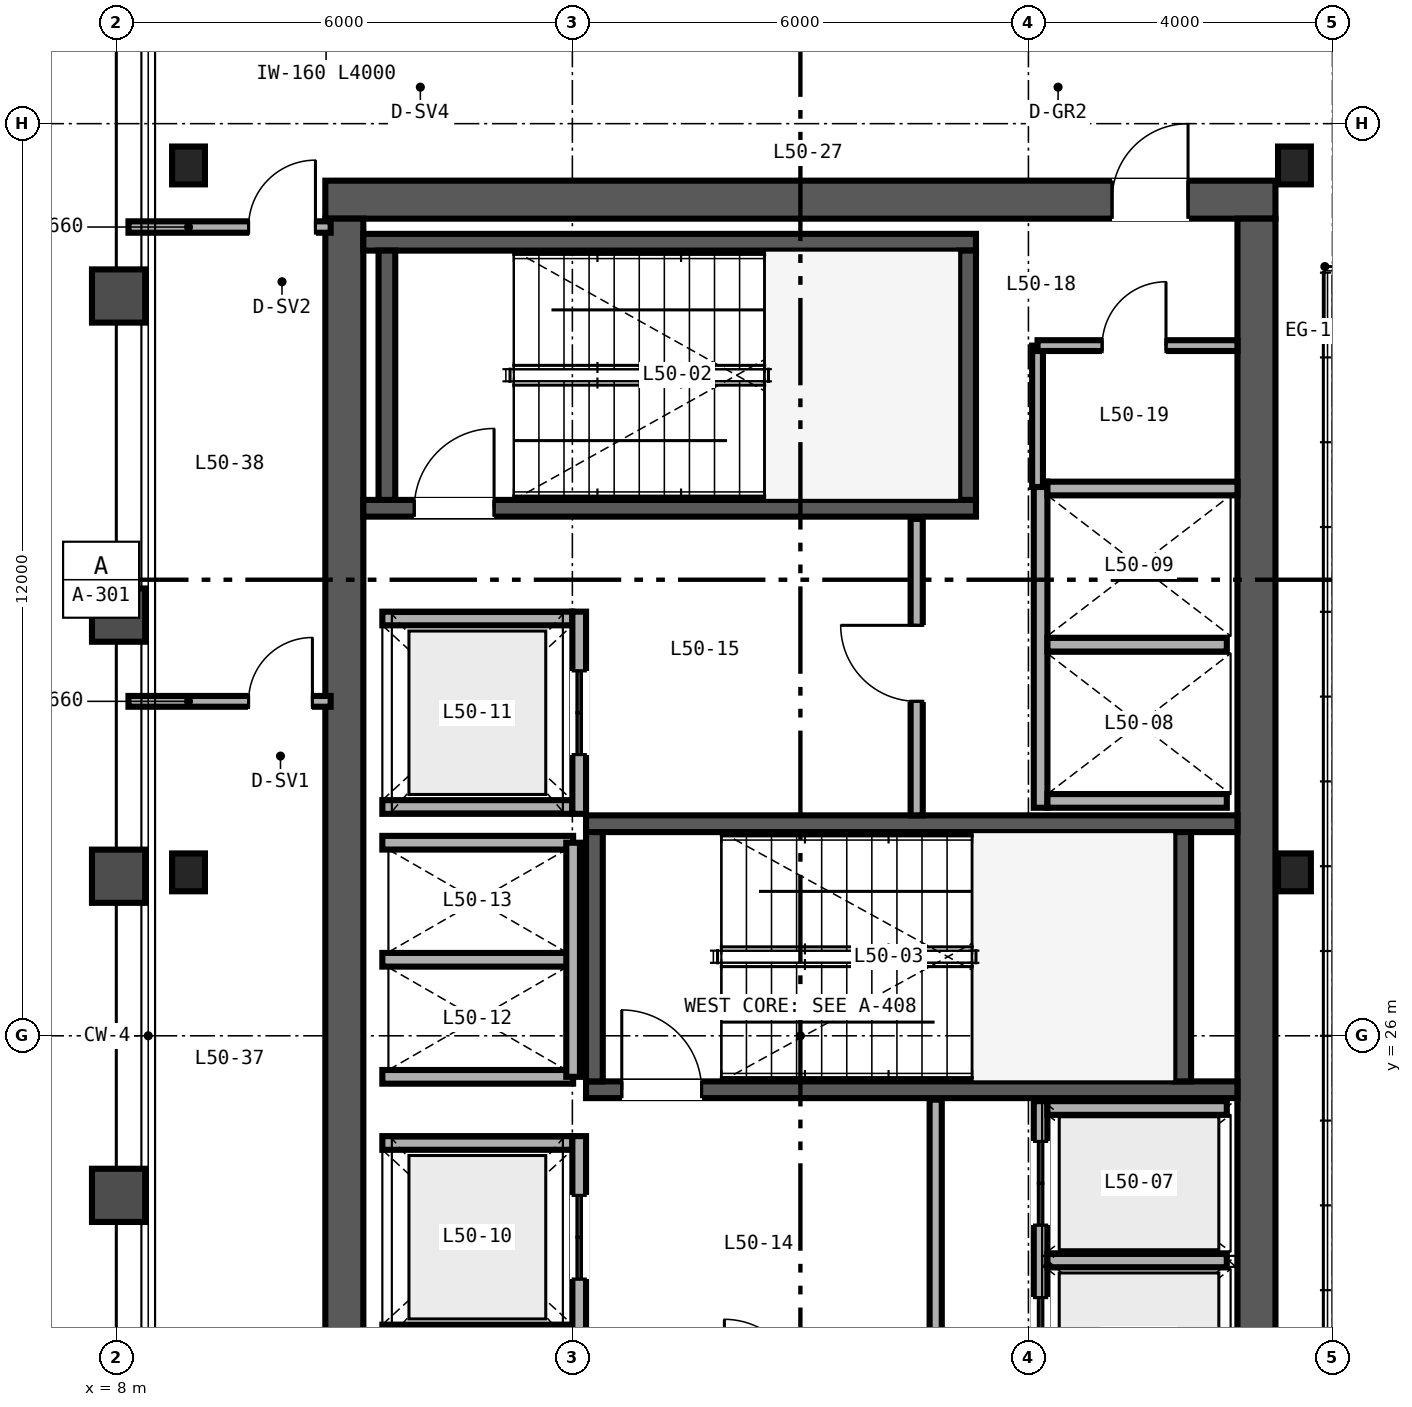
"""IFC4 building model, lengths in metres.
Left out: names, types, materials, properties, quantities, classifications, styles, units other than length and angle.
Written with IfcOpenShell. Run it as: python <this file> out.ifc"""

import sys

from ifc_helpers import new_model, si_unit, direction, frame, frame_2d, origin, origin_2d, place, context, subcontext, project, spatial, rectangle, i_section, extrude, source, transform, mapped, element, fill, save


model = new_model("IFC4")
c1 = context("Model", 3, precision=1e-05, world=origin(), true_north=direction((0.0, 1.0)))
c2 = subcontext(c1, "Body", "Model", "MODEL_VIEW")
j1 = project(units=[si_unit("LENGTHUNIT", "METRE"), si_unit("PLANEANGLEUNIT", "RADIAN")], contexts=[c1])
p1 = place(None, origin())
s1 = spatial("IfcSite", under=j1, at=p1, CompositionType="ELEMENT")
p2 = place(p1, origin())
s2 = spatial("IfcBuilding", under=s1, at=p2, CompositionType="ELEMENT")
p3 = place(p2, frame((0.0, 0.0, 199.2)))
s3 = spatial("IfcBuildingStorey", under=s2, at=p3, CompositionType="ELEMENT", Elevation=199.2)
p4 = place(p3, frame((10.75, 37.0, 0.0), z_axis=(0.0, 0.0, 1.0), x_axis=(1.0, 0.0, 0.0)))
e1 = element("IfcWall", 1, at=p4, inside=s3, PredefinedType="SHEAR", context=c2, shape_type="SweptSolid", body=[
    extrude(rectangle(XDim=12.5, YDim=0.5, at=frame_2d((6.25, 0.0))), origin(), (0.0, 0.0, 1.0), 3.37),
])
p5 = place(p4, frame((10.35, 0.0, 0.0)))
e2 = element("IfcOpeningElement", 2, at=p5, cuts=e1, PredefinedType="OPENING", context=c2, shape_type="SweptSolid", body=[
    extrude(rectangle(XDim=1.0, YDim=2.15, at=frame_2d((0.5, 1.075))), frame((0.0, 0.26, 0.0), z_axis=(0.0, -1.0, 0.0), x_axis=(1.0, 0.0, 0.0)), (0.0, 0.0, 1.0), 0.52),
])
for number, where, z_axis, x_axis in (
    (3, (11.0, 15.25, 0.0), (0.0, 0.0, 1.0), (0.0, 1.0, 0.0)),
    (4, (23.0, 15.25, 0.0), (0.0, 0.0, 1.0), (0.0, 1.0, 0.0)),
):
    element("IfcWall", number, at=place(p3, frame(where, z_axis=z_axis, x_axis=x_axis)), inside=s3, PredefinedType="SHEAR", context=c2, shape_type="SweptSolid", body=[
        extrude(rectangle(XDim=21.5, YDim=0.5, at=frame_2d((10.75, 0.0))), origin(), (0.0, 0.0, 1.0), 3.37),
    ])
p6 = place(p3, frame((11.25, 32.94, 0.0), z_axis=(0.0, 0.0, 1.0), x_axis=(1.0, 0.0, 0.0)))
e5 = element("IfcWall", 5, at=p6, inside=s3, PredefinedType="SHEAR", context=c2, shape_type="SweptSolid", body=[
    extrude(rectangle(XDim=8.06, YDim=0.22, at=frame_2d((4.03, 0.0))), origin(), (0.0, 0.0, 1.0), 3.4),
])
p7 = place(p6, frame((0.67, 0.0, 0.0)))
e6 = element("IfcOpeningElement", 6, at=p7, cuts=e5, PredefinedType="OPENING", context=c2, shape_type="SweptSolid", body=[
    extrude(rectangle(XDim=1.05, YDim=2.15, at=frame_2d((0.525, 1.075))), frame((0.0, 0.12, 0.0), z_axis=(0.0, -1.0, 0.0), x_axis=(1.0, 0.0, 0.0)), (0.0, 0.0, 1.0), 0.24),
])
p8 = place(p3, frame((11.25, 36.44, 0.0), z_axis=(0.0, 0.0, 1.0), x_axis=(1.0, 0.0, 0.0)))
e7 = element("IfcWall", 7, at=p8, inside=s3, PredefinedType="SHEAR", context=c2, shape_type="SweptSolid", body=[
    extrude(rectangle(XDim=8.06, YDim=0.22, at=frame_2d((4.03, 0.0))), origin(), (0.0, 0.0, 1.0), 3.4),
])
for number, where, z_axis, x_axis in (
    (8, (11.56, 33.05, 0.0), (0.0, 0.0, 1.0), (0.0, 1.0, 0.0)),
    (9, (19.2, 33.05, 0.0), (0.0, 0.0, 1.0), (0.0, 1.0, 0.0)),
):
    element("IfcWall", number, at=place(p3, frame(where, z_axis=z_axis, x_axis=x_axis)), inside=s3, PredefinedType="SHEAR", context=c2, shape_type="SweptSolid", body=[
        extrude(rectangle(XDim=3.28, YDim=0.22, at=frame_2d((1.64, 0.0))), origin(), (0.0, 0.0, 1.0), 3.4),
    ])
p9 = place(p3, frame((14.18, 25.29, 0.0), z_axis=(0.0, 0.0, 1.0), x_axis=(1.0, 0.0, 0.0)))
e10 = element("IfcWall", 10, at=p9, inside=s3, PredefinedType="SHEAR", context=c2, shape_type="SweptSolid", body=[
    extrude(rectangle(XDim=8.57, YDim=0.22, at=frame_2d((4.285, 0.0))), origin(), (0.0, 0.0, 1.0), 3.4),
])
p10 = place(p9, frame((0.47, 0.0, 0.0)))
e11 = element("IfcOpeningElement", 11, at=p10, cuts=e10, PredefinedType="OPENING", context=c2, shape_type="SweptSolid", body=[
    extrude(rectangle(XDim=1.05, YDim=2.15, at=frame_2d((0.525, 1.075))), frame((0.0, 0.12, 0.0), z_axis=(0.0, -1.0, 0.0), x_axis=(1.0, 0.0, 0.0)), (0.0, 0.0, 1.0), 0.24),
])
p11 = place(p3, frame((14.18, 28.79, 0.0), z_axis=(0.0, 0.0, 1.0), x_axis=(1.0, 0.0, 0.0)))
e12 = element("IfcWall", 12, at=p11, inside=s3, PredefinedType="SHEAR", context=c2, shape_type="SweptSolid", body=[
    extrude(rectangle(XDim=8.57, YDim=0.22, at=frame_2d((4.285, 0.0))), origin(), (0.0, 0.0, 1.0), 3.4),
])
for number, where, z_axis, x_axis in (
    (13, (14.29, 25.4, 0.0), (0.0, 0.0, 1.0), (0.0, 1.0, 0.0)),
    (14, (22.03, 25.4, 0.0), (0.0, 0.0, 1.0), (0.0, 1.0, 0.0)),
):
    element("IfcWall", number, at=place(p3, frame(where, z_axis=z_axis, x_axis=x_axis)), inside=s3, PredefinedType="SHEAR", context=c2, shape_type="SweptSolid", body=[
        extrude(rectangle(XDim=3.28, YDim=0.22, at=frame_2d((1.64, 0.0))), origin(), (0.0, 0.0, 1.0), 3.4),
    ])
m1 = source(origin(), c2, "Body", "SweptSolid", [
    extrude(i_section(OverallWidth=0.432, OverallDepth=0.498, WebThickness=0.056, FlangeThickness=0.089, FilletRadius=0.025, at=origin_2d()), origin(), (0.0, 0.0, 1.0), 3.37),
])
for number, where, z_axis, x_axis in (
    (15, (8.95, 28.15, 0.0), (0.0, 0.0, 1.0), (1.0, 0.0, 0.0)),
    (16, (23.5, 28.15, 0.0), (0.0, 0.0, 1.0), (1.0, 0.0, 0.0)),
    (17, (8.95, 37.45, 0.0), (0.0, 0.0, 1.0), (1.0, 0.0, 0.0)),
    (18, (23.5, 37.45, 0.0), (0.0, 0.0, 1.0), (1.0, 0.0, 0.0)),
):
    element("IfcColumn", number, at=place(p3, frame(where, z_axis=z_axis, x_axis=x_axis)), inside=s3, PredefinedType="COLUMN", context=c2, shape_type="MappedRepresentation", body=[
        mapped(m1, transform((0.0, 0.0, 0.0), scale=1.0)),
    ])
p12 = place(p3, frame((20.16, 18.82, 0.0), z_axis=(0.0, 0.0, 1.0), x_axis=(0.0, 1.0, 0.0)))
e19 = element("IfcWall", 19, at=p12, inside=s3, PredefinedType="SOLIDWALL", context=c2, shape_type="SweptSolid", body=[
    extrude(rectangle(XDim=6.32, YDim=0.18, at=frame_2d((3.16, 0.0))), origin(), (0.0, 0.0, 1.0), 2.47),
])
p13 = place(p12, frame((0.555, 0.0, 0.0)))
e20 = element("IfcOpeningElement", 20, at=p13, cuts=e19, PredefinedType="OPENING", context=c2, shape_type="SweptSolid", body=[
    extrude(rectangle(XDim=1.1, YDim=2.2, at=frame_2d((0.55, 1.1))), frame((0.0, 0.1, 0.0), z_axis=(0.0, -1.0, 0.0), x_axis=(1.0, 0.0, 0.0)), (0.0, 0.0, 1.0), 0.2),
])
p14 = place(p12, frame((2.635, 0.0, 0.0)))
e21 = element("IfcOpeningElement", 21, at=p14, cuts=e19, PredefinedType="OPENING", context=c2, shape_type="SweptSolid", body=[
    extrude(rectangle(XDim=1.1, YDim=2.2, at=frame_2d((0.55, 1.1))), frame((0.0, 0.1, 0.0), z_axis=(0.0, -1.0, 0.0), x_axis=(1.0, 0.0, 0.0)), (0.0, 0.0, 1.0), 0.2),
])
p15 = place(p12, frame((4.69, 0.0, 0.0)))
e22 = element("IfcOpeningElement", 22, at=p15, cuts=e19, PredefinedType="OPENING", context=c2, shape_type="SweptSolid", body=[
    extrude(rectangle(XDim=1.1, YDim=2.2, at=frame_2d((0.55, 1.1))), frame((0.0, 0.1, 0.0), z_axis=(0.0, -1.0, 0.0), x_axis=(1.0, 0.0, 0.0)), (0.0, 0.0, 1.0), 0.2),
])
for number, where, z_axis, x_axis in (
    (23, (20.25, 25.05, 0.0), (0.0, 0.0, 1.0), (1.0, 0.0, 0.0)),
    (24, (20.25, 23.045, 0.0), (0.0, 0.0, 1.0), (1.0, 0.0, 0.0)),
):
    element("IfcWall", number, at=place(p3, frame(where, z_axis=z_axis, x_axis=x_axis)), inside=s3, PredefinedType="SOLIDWALL", context=c2, shape_type="SweptSolid", body=[
        extrude(rectangle(XDim=2.36, YDim=0.18, at=frame_2d((1.18, 0.0))), origin(), (0.0, 0.0, 1.0), 3.37),
    ])
p16 = place(p3, frame((20.16, 29.0, 0.0), z_axis=(0.0, 0.0, 1.0), x_axis=(0.0, 1.0, 0.0)))
e25 = element("IfcWall", 25, at=p16, inside=s3, PredefinedType="SOLIDWALL", context=c2, shape_type="SweptSolid", body=[
    extrude(rectangle(XDim=4.29, YDim=0.18, at=frame_2d((2.145, 0.0))), origin(), (0.0, 0.0, 1.0), 3.37),
])
p17 = place(p3, frame((20.25, 29.09, 0.0), z_axis=(0.0, 0.0, 1.0), x_axis=(1.0, 0.0, 0.0)))
e26 = element("IfcWall", 26, at=p17, inside=s3, PredefinedType="SOLIDWALL", context=c2, shape_type="SweptSolid", body=[
    extrude(rectangle(XDim=2.36, YDim=0.18, at=frame_2d((1.18, 0.0))), origin(), (0.0, 0.0, 1.0), 3.37),
])
p18 = place(p3, frame((20.25, 33.2, 0.0), z_axis=(0.0, 0.0, 1.0), x_axis=(1.0, 0.0, 0.0)))
e27 = element("IfcWall", 27, at=p18, inside=s3, PredefinedType="SOLIDWALL", context=c2, shape_type="SweptSolid", body=[
    extrude(rectangle(XDim=2.5, YDim=0.18, at=frame_2d((1.25, 0.0))), origin(), (0.0, 0.0, 1.0), 3.37),
])
p19 = place(p3, frame((20.25, 31.145, 0.0), z_axis=(0.0, 0.0, 1.0), x_axis=(1.0, 0.0, 0.0)))
e28 = element("IfcWall", 28, at=p19, inside=s3, PredefinedType="SOLIDWALL", context=c2, shape_type="SweptSolid", body=[
    extrude(rectangle(XDim=2.36, YDim=0.18, at=frame_2d((1.18, 0.0))), origin(), (0.0, 0.0, 1.0), 3.37),
])
for number, where, z_axis, x_axis in (
    (29, (11.5, 22.11, 0.0), (0.0, 0.0, 1.0), (1.0, 0.0, 0.0)),
    (30, (11.5, 24.59, 0.0), (0.0, 0.0, 1.0), (1.0, 0.0, 0.0)),
):
    element("IfcWall", number, at=place(p3, frame(where, z_axis=z_axis, x_axis=x_axis)), inside=s3, PredefinedType="SOLIDWALL", context=c2, shape_type="SweptSolid", body=[
        extrude(rectangle(XDim=2.5, YDim=0.18, at=frame_2d((1.25, 0.0))), origin(), (0.0, 0.0, 1.0), 3.37),
    ])
p20 = place(p3, frame((14.09, 22.02, 0.0), z_axis=(0.0, 0.0, 1.0), x_axis=(0.0, 1.0, 0.0)))
e31 = element("IfcWall", 31, at=p20, inside=s3, PredefinedType="SOLIDWALL", context=c2, shape_type="SweptSolid", body=[
    extrude(rectangle(XDim=2.66, YDim=0.18, at=frame_2d((1.33, 0.0))), origin(), (0.0, 0.0, 1.0), 3.37),
])
p21 = place(p20, frame((0.78, 0.0, 0.0)))
e32 = element("IfcOpeningElement", 32, at=p21, cuts=e31, PredefinedType="OPENING", context=c2, shape_type="SweptSolid", body=[
    extrude(rectangle(XDim=1.1, YDim=2.2, at=frame_2d((0.55, 1.1))), frame((0.0, 0.1, 0.0), z_axis=(0.0, -1.0, 0.0), x_axis=(1.0, 0.0, 0.0)), (0.0, 0.0, 1.0), 0.2),
])
for number, where, z_axis, x_axis in (
    (33, (11.5, 29.01, 0.0), (0.0, 0.0, 1.0), (1.0, 0.0, 0.0)),
    (34, (11.5, 31.49, 0.0), (0.0, 0.0, 1.0), (1.0, 0.0, 0.0)),
):
    element("IfcWall", number, at=place(p3, frame(where, z_axis=z_axis, x_axis=x_axis)), inside=s3, PredefinedType="SOLIDWALL", context=c2, shape_type="SweptSolid", body=[
        extrude(rectangle(XDim=2.5, YDim=0.18, at=frame_2d((1.25, 0.0))), origin(), (0.0, 0.0, 1.0), 3.37),
    ])
p22 = place(p3, frame((14.09, 28.92, 0.0), z_axis=(0.0, 0.0, 1.0), x_axis=(0.0, 1.0, 0.0)))
e35 = element("IfcWall", 35, at=p22, inside=s3, PredefinedType="SOLIDWALL", context=c2, shape_type="SweptSolid", body=[
    extrude(rectangle(XDim=2.66, YDim=0.18, at=frame_2d((1.33, 0.0))), origin(), (0.0, 0.0, 1.0), 3.37),
])
p23 = place(p22, frame((0.78, 0.0, 0.0)))
e36 = element("IfcOpeningElement", 36, at=p23, cuts=e35, PredefinedType="OPENING", context=c2, shape_type="SweptSolid", body=[
    extrude(rectangle(XDim=1.1, YDim=2.2, at=frame_2d((0.55, 1.1))), frame((0.0, 0.1, 0.0), z_axis=(0.0, -1.0, 0.0), x_axis=(1.0, 0.0, 0.0)), (0.0, 0.0, 1.0), 0.2),
])
for number, where, z_axis, x_axis in (
    (37, (11.5, 25.46, 0.0), (0.0, 0.0, 1.0), (1.0, 0.0, 0.0)),
    (38, (11.5, 27.0, 0.0), (0.0, 0.0, 1.0), (1.0, 0.0, 0.0)),
    (39, (11.5, 28.54, 0.0), (0.0, 0.0, 1.0), (1.0, 0.0, 0.0)),
):
    element("IfcWall", number, at=place(p3, frame(where, z_axis=z_axis, x_axis=x_axis)), inside=s3, PredefinedType="SOLIDWALL", context=c2, shape_type="SweptSolid", body=[
        extrude(rectangle(XDim=2.51, YDim=0.18, at=frame_2d((1.255, 0.0))), origin(), (0.0, 0.0, 1.0), 3.37),
    ])
p24 = place(p3, frame((14.01, 25.46, 0.0), z_axis=(0.0, 0.0, 1.0), x_axis=(0.0, 1.0, 0.0)))
e40 = element("IfcWall", 40, at=p24, inside=s3, PredefinedType="SOLIDWALL", context=c2, shape_type="SweptSolid", body=[
    extrude(rectangle(XDim=3.08, YDim=0.18, at=frame_2d((1.54, 0.0))), origin(), (0.0, 0.0, 1.0), 3.37),
])
p25 = place(p3, frame((18.78, 21.35, 0.0), z_axis=(0.0, 0.0, 1.0), x_axis=(0.0, 1.0, 0.0)))
e41 = element("IfcWall", 41, at=p25, inside=s3, PredefinedType="PARTITIONING", context=c2, shape_type="SweptSolid", body=[
    extrude(rectangle(XDim=3.81, YDim=0.16, at=frame_2d((1.905, 0.0))), origin(), (0.0, 0.0, 1.0), 3.37),
])
p26 = place(p3, frame((18.53, 28.9, 0.0), z_axis=(0.0, 0.0, 1.0), x_axis=(0.0, 1.0, 0.0)))
e42 = element("IfcWall", 42, at=p26, inside=s3, PredefinedType="PARTITIONING", context=c2, shape_type="SweptSolid", body=[
    extrude(rectangle(XDim=3.9, YDim=0.16, at=frame_2d((1.95, 0.0))), origin(), (0.0, 0.0, 1.0), 3.37),
])
p27 = place(p26, frame((1.5, 0.0, 0.0)))
e43 = element("IfcOpeningElement", 43, at=p27, cuts=e42, PredefinedType="OPENING", context=c2, shape_type="SweptSolid", body=[
    extrude(rectangle(XDim=1.0, YDim=2.15, at=frame_2d((0.5, 1.075))), frame((0.0, 0.09, 0.0), z_axis=(0.0, -1.0, 0.0), x_axis=(1.0, 0.0, 0.0)), (0.0, 0.0, 1.0), 0.18),
])
p28 = place(p3, frame((20.12, 33.22, 0.0), z_axis=(0.0, 0.0, 1.0), x_axis=(0.0, 1.0, 0.0)))
e44 = element("IfcWall", 44, at=p28, inside=s3, PredefinedType="PARTITIONING", context=c2, shape_type="SweptSolid", body=[
    extrude(rectangle(XDim=1.86, YDim=0.142, at=frame_2d((0.93, 0.0))), origin(), (0.0, 0.0, 1.0), 3.37),
])
p29 = place(p3, frame((20.12, 35.08, 0.0), z_axis=(0.0, 0.0, 1.0), x_axis=(1.0, 0.0, 0.0)))
e45 = element("IfcWall", 45, at=p29, inside=s3, PredefinedType="PARTITIONING", context=c2, shape_type="SweptSolid", body=[
    extrude(rectangle(XDim=2.63, YDim=0.142, at=frame_2d((1.315, 0.0))), origin(), (0.0, 0.0, 1.0), 3.37),
])
p30 = place(p29, frame((0.85, 0.0, 0.0)))
e46 = element("IfcOpeningElement", 46, at=p30, cuts=e45, PredefinedType="OPENING", context=c2, shape_type="SweptSolid", body=[
    extrude(rectangle(XDim=0.84, YDim=2.1, at=frame_2d((0.42, 1.05))), frame((0.0, 0.081, 0.0), z_axis=(0.0, -1.0, 0.0), x_axis=(1.0, 0.0, 0.0)), (0.0, 0.0, 1.0), 0.162),
])
p31 = place(p3, frame((8.16, 36.64, 0.0), z_axis=(0.0, 0.0, 1.0), x_axis=(1.0, 0.0, 0.0)))
e47 = element("IfcWall", 47, at=p31, inside=s3, PredefinedType="PARTITIONING", context=c2, shape_type="SweptSolid", body=[
    extrude(rectangle(XDim=2.66, YDim=0.15, at=frame_2d((1.33, 0.0))), origin(), (0.0, 0.0, 1.0), 2.753),
])
p32 = place(p31, frame((1.58, 0.0, 0.0)))
e48 = element("IfcOpeningElement", 48, at=p32, cuts=e47, PredefinedType="OPENING", context=c2, shape_type="SweptSolid", body=[
    extrude(rectangle(XDim=0.88, YDim=2.15, at=frame_2d((0.44, 1.075))), frame((0.0, 0.085, 0.0), z_axis=(0.0, -1.0, 0.0), x_axis=(1.0, 0.0, 0.0)), (0.0, 0.0, 1.0), 0.17),
])
p33 = place(p3, frame((8.16, 30.4, 0.0), z_axis=(0.0, 0.0, 1.0), x_axis=(1.0, 0.0, 0.0)))
e49 = element("IfcWall", 49, at=p33, inside=s3, PredefinedType="PARTITIONING", context=c2, shape_type="SweptSolid", body=[
    extrude(rectangle(XDim=2.66, YDim=0.142, at=frame_2d((1.33, 0.0))), origin(), (0.0, 0.0, 1.0), 2.753),
])
p34 = place(p33, frame((1.58, 0.0, 0.0)))
e50 = element("IfcOpeningElement", 50, at=p34, cuts=e49, PredefinedType="OPENING", context=c2, shape_type="SweptSolid", body=[
    extrude(rectangle(XDim=0.84, YDim=2.1, at=frame_2d((0.42, 1.05))), frame((0.0, 0.081, 0.0), z_axis=(0.0, -1.0, 0.0), x_axis=(1.0, 0.0, 0.0)), (0.0, 0.0, 1.0), 0.162),
])
m2 = source(origin(), c2, "Body", "SweptSolid", [
    extrude(rectangle(XDim=1.05, YDim=2.15, at=frame_2d((0.525, 1.075))), frame((0.0, 0.025, 0.0), z_axis=(0.0, -1.0, 0.0), x_axis=(1.0, 0.0, 0.0)), (0.0, 0.0, 1.0), 0.05),
])
p35 = place(p7, origin())
e51 = element("IfcDoor", 51, at=p35, inside=s3, OperationType="SINGLE_SWING_RIGHT", PredefinedType="DOOR", context=c2, shape_type="MappedRepresentation", body=[
    mapped(m2, transform((0.0, 0.0, 0.0), scale=1.0)),
])
fill(e6, e51)
p36 = place(p10, origin())
e52 = element("IfcDoor", 52, at=p36, inside=s3, OperationType="SINGLE_SWING_LEFT", PredefinedType="DOOR", context=c2, shape_type="MappedRepresentation", body=[
    mapped(m2, transform((0.0, 0.0, 0.0), scale=1.0)),
])
fill(e11, e52)
m3 = source(origin(), c2, "Body", "SweptSolid", [
    extrude(rectangle(XDim=1.1, YDim=2.2, at=frame_2d((0.55, 1.1))), frame((0.0, 0.025, 0.0), z_axis=(0.0, -1.0, 0.0), x_axis=(1.0, 0.0, 0.0)), (0.0, 0.0, 1.0), 0.05),
])
p37 = place(p14, origin())
e53 = element("IfcDoor", 53, at=p37, inside=s3, OperationType="DOUBLE_DOOR_SLIDING", PredefinedType="DOOR", context=c2, shape_type="MappedRepresentation", body=[
    mapped(m3, transform((0.0, 0.0, 0.0), scale=1.0)),
])
fill(e21, e53)
p38 = place(p15, origin())
e54 = element("IfcDoor", 54, at=p38, inside=s3, OperationType="DOUBLE_DOOR_SLIDING", PredefinedType="DOOR", context=c2, shape_type="MappedRepresentation", body=[
    mapped(m3, transform((0.0, 0.0, 0.0), scale=1.0)),
])
fill(e22, e54)
p39 = place(p21, origin())
e55 = element("IfcDoor", 55, at=p39, inside=s3, OperationType="DOUBLE_DOOR_SLIDING", PredefinedType="DOOR", context=c2, shape_type="MappedRepresentation", body=[
    mapped(m3, transform((0.0, 0.0, 0.0), scale=1.0)),
])
fill(e32, e55)
p40 = place(p23, origin())
e56 = element("IfcDoor", 56, at=p40, inside=s3, OperationType="DOUBLE_DOOR_SLIDING", PredefinedType="DOOR", context=c2, shape_type="MappedRepresentation", body=[
    mapped(m3, transform((0.0, 0.0, 0.0), scale=1.0)),
])
fill(e36, e56)
m4 = source(origin(), c2, "Body", "SweptSolid", [
    extrude(rectangle(XDim=1.0, YDim=2.15, at=frame_2d((0.5, 1.075))), frame((0.0, 0.025, 0.0), z_axis=(0.0, -1.0, 0.0), x_axis=(1.0, 0.0, 0.0)), (0.0, 0.0, 1.0), 0.05),
])
p41 = place(p27, origin())
e57 = element("IfcDoor", 57, at=p41, inside=s3, OperationType="SINGLE_SWING_RIGHT", PredefinedType="DOOR", context=c2, shape_type="MappedRepresentation", body=[
    mapped(m4, transform((0.0, 0.0, 0.0), scale=1.0)),
])
fill(e43, e57)
m5 = source(origin(), c2, "Body", "SweptSolid", [
    extrude(rectangle(XDim=0.84, YDim=2.1, at=frame_2d((0.42, 1.05))), frame((0.0, 0.025, 0.0), z_axis=(0.0, -1.0, 0.0), x_axis=(1.0, 0.0, 0.0)), (0.0, 0.0, 1.0), 0.05),
])
p42 = place(p30, origin())
e58 = element("IfcDoor", 58, at=p42, inside=s3, OperationType="SINGLE_SWING_RIGHT", PredefinedType="DOOR", context=c2, shape_type="MappedRepresentation", body=[
    mapped(m5, transform((0.0, 0.0, 0.0), scale=1.0)),
])
fill(e46, e58)
p43 = place(p5, origin())
e59 = element("IfcDoor", 59, at=p43, inside=s3, OperationType="SINGLE_SWING_RIGHT", PredefinedType="DOOR", context=c2, shape_type="MappedRepresentation", body=[
    mapped(m4, transform((0.0, 0.0, 0.0), scale=1.0)),
])
fill(e2, e59)
m6 = source(origin(), c2, "Body", "SweptSolid", [
    extrude(rectangle(XDim=0.88, YDim=2.15, at=frame_2d((0.44, 1.075))), frame((0.0, 0.025, 0.0), z_axis=(0.0, -1.0, 0.0), x_axis=(1.0, 0.0, 0.0)), (0.0, 0.0, 1.0), 0.05),
])
p44 = place(p32, origin())
e60 = element("IfcDoor", 60, at=p44, inside=s3, OperationType="SINGLE_SWING_RIGHT", PredefinedType="DOOR", context=c2, shape_type="MappedRepresentation", body=[
    mapped(m6, transform((0.0, 0.0, 0.0), scale=1.0)),
])
fill(e48, e60)
p45 = place(p34, origin())
e61 = element("IfcDoor", 61, at=p45, inside=s3, OperationType="SINGLE_SWING_RIGHT", PredefinedType="DOOR", context=c2, shape_type="MappedRepresentation", body=[
    mapped(m5, transform((0.0, 0.0, 0.0), scale=1.0)),
])
fill(e50, e61)
save(model, sys.argv[1])
